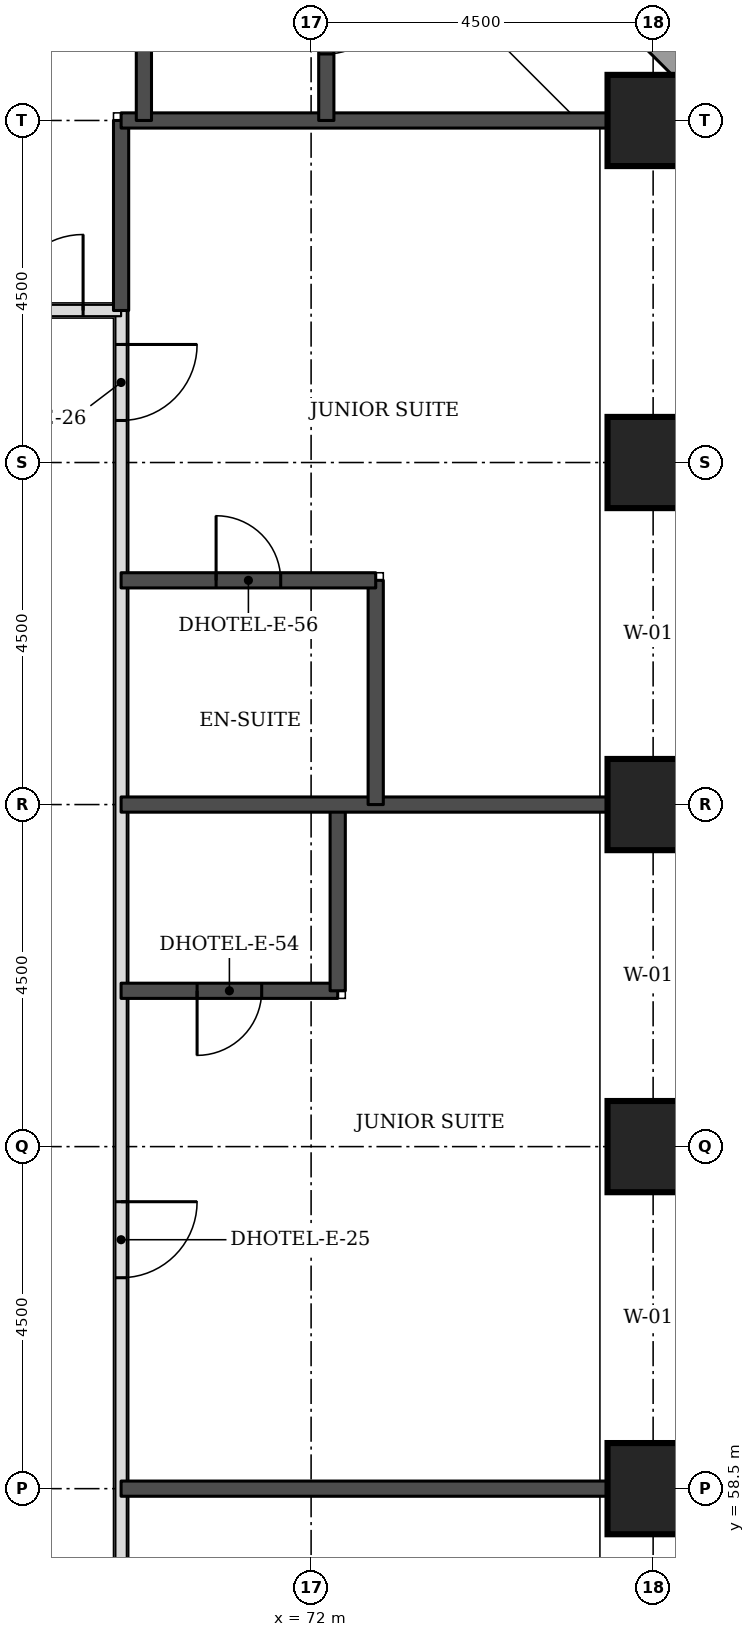
"""IFC4 building model, lengths in metres.
Left out: names, types, materials, properties, quantities, classifications, styles, units other than length and angle.
Written with IfcOpenShell. Run it as: python <this file> out.ifc"""

import sys

from ifc_helpers import new_model, si_unit, direction, frame, frame_2d, origin, origin_2d, place, context, subcontext, project, spatial, rectangle, extrude, element, fill, save


model = new_model("IFC4")
c1 = context("Model", 3, precision=1e-05, world=origin(), true_north=direction((0.0, 1.0)))
c2 = subcontext(c1, "Body", "Model", "MODEL_VIEW")
j1 = project(units=[si_unit("LENGTHUNIT", "METRE"), si_unit("PLANEANGLEUNIT", "RADIAN")], contexts=[c1])
p1 = place(None, origin())
s1 = spatial("IfcSite", under=j1, at=p1, CompositionType="ELEMENT")
p2 = place(p1, origin())
s2 = spatial("IfcBuilding", under=s1, at=p2, CompositionType="ELEMENT")
p3 = place(p2, frame((0.0, 0.0, 39.6)))
s3 = spatial("IfcBuildingStorey", under=s2, at=p3, CompositionType="ELEMENT", Elevation=39.6)
for number, where, z_axis, x_axis in (
    (1, (76.5, 58.5, 0.0), (0.0, 0.0, 1.0), (1.0, 0.0, 0.0)),
    (2, (76.5, 63.0, 0.0), (0.0, 0.0, 1.0), (1.0, 0.0, 0.0)),
    (3, (76.5, 67.5, 0.0), (0.0, 0.0, 1.0), (1.0, 0.0, 0.0)),
    (4, (76.5, 72.0, 0.0), (0.0, 0.0, 1.0), (1.0, 0.0, 0.0)),
    (5, (76.5, 76.5, 0.0), (0.0, 0.0, 1.0), (1.0, 0.0, 0.0)),
):
    element("IfcColumn", number, at=place(p3, frame(where, z_axis=z_axis, x_axis=x_axis)), inside=s3, PredefinedType="COLUMN", context=c2, shape_type="SweptSolid", body=[
        extrude(rectangle(XDim=1.2, YDim=1.2, at=origin_2d()), origin(), (0.0, 0.0, 1.0), 3.3),
    ])
p4 = place(p3, frame((77.326, 76.77, 0.0), z_axis=(0.0, 0.0, 1.0), x_axis=(-0.707106781187, 0.707106781187, 0.0)))
e6 = element("IfcWall", 6, at=p4, inside=s3, PredefinedType="STANDARD", context=c2, shape_type="SweptSolid", body=[
    extrude(rectangle(XDim=7.151, YDim=0.35, at=frame_2d((3.576, 0.0))), origin(), (0.0, 0.0, 1.0), 3.055),
])
p5 = place(p4, frame((1.926, 0.0, 0.8)))
e7 = element("IfcOpeningElement", 7, at=p5, cuts=e6, PredefinedType="OPENING", context=c2, shape_type="SweptSolid", body=[
    extrude(rectangle(XDim=3.3, YDim=1.5, at=frame_2d((1.65, 0.75))), frame((0.0, 0.185, 0.0), z_axis=(0.0, -1.0, 0.0), x_axis=(1.0, 0.0, 0.0)), (0.0, 0.0, 1.0), 0.37),
])
p6 = place(p3, frame((69.5, 47.5, 0.0), z_axis=(0.0, 0.0, 1.0), x_axis=(0.0, 1.0, 0.0)))
e8 = element("IfcWall", 8, at=p6, inside=s3, PredefinedType="PARTITIONING", context=c2, shape_type="SweptSolid", body=[
    extrude(rectangle(XDim=26.5, YDim=0.15, at=frame_2d((13.25, 0.0))), origin(), (0.0, 0.0, 1.0), 3.08),
])
p7 = place(p6, frame((25.053, 0.0, 0.0)))
e9 = element("IfcOpeningElement", 9, at=p7, cuts=e8, PredefinedType="OPENING", context=c2, shape_type="SweptSolid", body=[
    extrude(rectangle(XDim=1.0, YDim=2.1, at=frame_2d((0.5, 1.05))), frame((0.0, 0.085, 0.0), z_axis=(0.0, -1.0, 0.0), x_axis=(1.0, 0.0, 0.0)), (0.0, 0.0, 1.0), 0.17),
])
p8 = place(p6, frame((13.775, 0.0, 0.0)))
e10 = element("IfcOpeningElement", 10, at=p8, cuts=e8, PredefinedType="OPENING", context=c2, shape_type="SweptSolid", body=[
    extrude(rectangle(XDim=1.0, YDim=2.1, at=frame_2d((0.5, 1.05))), frame((0.0, 0.085, 0.0), z_axis=(0.0, -1.0, 0.0), x_axis=(1.0, 0.0, 0.0)), (0.0, 0.0, 1.0), 0.17),
])
p9 = place(p6, frame((7.65, 0.0, 0.0)))
e11 = element("IfcOpeningElement", 11, at=p9, cuts=e8, PredefinedType="OPENING", context=c2, shape_type="SweptSolid", body=[
    extrude(rectangle(XDim=1.1, YDim=2.1, at=frame_2d((0.55, 1.05))), frame((0.0, 0.085, 0.0), z_axis=(0.0, -1.0, 0.0), x_axis=(1.0, 0.0, 0.0)), (0.0, 0.0, 1.0), 0.17),
])
p10 = place(p6, frame((0.447, 0.0, 0.0)))
e12 = element("IfcOpeningElement", 12, at=p10, cuts=e8, PredefinedType="OPENING", context=c2, shape_type="SweptSolid", body=[
    extrude(rectangle(XDim=1.0, YDim=2.1, at=frame_2d((0.5, 1.05))), frame((0.0, 0.085, 0.0), z_axis=(0.0, -1.0, 0.0), x_axis=(1.0, 0.0, 0.0)), (0.0, 0.0, 1.0), 0.17),
])
p11 = place(p3, frame((43.0, 74.0, 0.0), z_axis=(0.0, 0.0, 1.0), x_axis=(1.0, 0.0, 0.0)))
e13 = element("IfcWall", 13, at=p11, inside=s3, PredefinedType="PARTITIONING", context=c2, shape_type="SweptSolid", body=[
    extrude(rectangle(XDim=26.5, YDim=0.15, at=frame_2d((13.25, 0.0))), origin(), (0.0, 0.0, 1.0), 3.08),
])
p12 = place(p11, frame((2.825, 0.0, 0.0)))
e14 = element("IfcOpeningElement", 14, at=p12, cuts=e13, PredefinedType="OPENING", context=c2, shape_type="SweptSolid", body=[
    extrude(rectangle(XDim=1.0, YDim=2.1, at=frame_2d((0.5, 1.05))), frame((0.0, 0.085, 0.0), z_axis=(0.0, -1.0, 0.0), x_axis=(1.0, 0.0, 0.0)), (0.0, 0.0, 1.0), 0.17),
])
p13 = place(p11, frame((11.975, 0.0, 0.0)))
e15 = element("IfcOpeningElement", 15, at=p13, cuts=e13, PredefinedType="OPENING", context=c2, shape_type="SweptSolid", body=[
    extrude(rectangle(XDim=1.0, YDim=2.1, at=frame_2d((0.5, 1.05))), frame((0.0, 0.085, 0.0), z_axis=(0.0, -1.0, 0.0), x_axis=(1.0, 0.0, 0.0)), (0.0, 0.0, 1.0), 0.17),
])
p14 = place(p11, frame((18.275, 0.0, 0.0)))
e16 = element("IfcOpeningElement", 16, at=p14, cuts=e13, PredefinedType="OPENING", context=c2, shape_type="SweptSolid", body=[
    extrude(rectangle(XDim=1.0, YDim=2.1, at=frame_2d((0.5, 1.05))), frame((0.0, 0.085, 0.0), z_axis=(0.0, -1.0, 0.0), x_axis=(1.0, 0.0, 0.0)), (0.0, 0.0, 1.0), 0.17),
])
p15 = place(p11, frame((0.5, 0.0, 0.0)))
e17 = element("IfcOpeningElement", 17, at=p15, cuts=e13, PredefinedType="OPENING", context=c2, shape_type="SweptSolid", body=[
    extrude(rectangle(XDim=1.0, YDim=2.1, at=frame_2d((0.5, 1.05))), frame((0.0, 0.085, 0.0), z_axis=(0.0, -1.0, 0.0), x_axis=(1.0, 0.0, 0.0)), (0.0, 0.0, 1.0), 0.17),
])
p16 = place(p11, frame((25.0, 0.0, 0.0)))
e18 = element("IfcOpeningElement", 18, at=p16, cuts=e13, PredefinedType="OPENING", context=c2, shape_type="SweptSolid", body=[
    extrude(rectangle(XDim=1.0, YDim=2.1, at=frame_2d((0.5, 1.05))), frame((0.0, 0.085, 0.0), z_axis=(0.0, -1.0, 0.0), x_axis=(1.0, 0.0, 0.0)), (0.0, 0.0, 1.0), 0.17),
])
p17 = place(p3, frame((69.5, 58.5, 0.0), z_axis=(0.0, 0.0, 1.0), x_axis=(1.0, 0.0, 0.0)))
e19 = element("IfcWall", 19, at=p17, inside=s3, PredefinedType="SOLIDWALL", context=c2, shape_type="SweptSolid", body=[
    extrude(rectangle(XDim=6.4, YDim=0.2, at=frame_2d((3.2, 0.0))), origin(), (0.0, 0.0, 1.0), 3.08),
])
p18 = place(p3, frame((69.5, 65.05, 0.0), z_axis=(0.0, 0.0, 1.0), x_axis=(1.0, 0.0, 0.0)))
e20 = element("IfcWall", 20, at=p18, inside=s3, PredefinedType="SOLIDWALL", context=c2, shape_type="SweptSolid", body=[
    extrude(rectangle(XDim=2.85, YDim=0.2, at=frame_2d((1.425, 0.0))), origin(), (0.0, 0.0, 1.0), 3.08),
])
p19 = place(p18, frame((1.0, 0.0, 0.0)))
e21 = element("IfcOpeningElement", 21, at=p19, cuts=e20, PredefinedType="OPENING", context=c2, shape_type="SweptSolid", body=[
    extrude(rectangle(XDim=0.85, YDim=2.1, at=frame_2d((0.425, 1.05))), frame((0.0, 0.11, 0.0), z_axis=(0.0, -1.0, 0.0), x_axis=(1.0, 0.0, 0.0)), (0.0, 0.0, 1.0), 0.22),
])
p20 = place(p3, frame((72.35, 65.05, 0.0), z_axis=(0.0, 0.0, 1.0), x_axis=(0.0, 1.0, 0.0)))
e22 = element("IfcWall", 22, at=p20, inside=s3, PredefinedType="SOLIDWALL", context=c2, shape_type="SweptSolid", body=[
    extrude(rectangle(XDim=2.45, YDim=0.2, at=frame_2d((1.225, 0.0))), origin(), (0.0, 0.0, 1.0), 3.08),
])
p21 = place(p3, frame((69.5, 67.5, 0.0), z_axis=(0.0, 0.0, 1.0), x_axis=(1.0, 0.0, 0.0)))
e23 = element("IfcWall", 23, at=p21, inside=s3, PredefinedType="SOLIDWALL", context=c2, shape_type="SweptSolid", body=[
    extrude(rectangle(XDim=6.4, YDim=0.2, at=frame_2d((3.2, 0.0))), origin(), (0.0, 0.0, 1.0), 3.08),
])
p22 = place(p3, frame((72.85, 67.5, 0.0), z_axis=(0.0, 0.0, 1.0), x_axis=(0.0, 1.0, 0.0)))
e24 = element("IfcWall", 24, at=p22, inside=s3, PredefinedType="SOLIDWALL", context=c2, shape_type="SweptSolid", body=[
    extrude(rectangle(XDim=2.95, YDim=0.2, at=frame_2d((1.475, 0.0))), origin(), (0.0, 0.0, 1.0), 3.08),
])
p23 = place(p3, frame((69.5, 70.45, 0.0), z_axis=(0.0, 0.0, 1.0), x_axis=(1.0, 0.0, 0.0)))
e25 = element("IfcWall", 25, at=p23, inside=s3, PredefinedType="SOLIDWALL", context=c2, shape_type="SweptSolid", body=[
    extrude(rectangle(XDim=3.35, YDim=0.2, at=frame_2d((1.675, 0.0))), origin(), (0.0, 0.0, 1.0), 3.08),
])
p24 = place(p23, frame((1.25, 0.0, 0.0)))
e26 = element("IfcOpeningElement", 26, at=p24, cuts=e25, PredefinedType="OPENING", context=c2, shape_type="SweptSolid", body=[
    extrude(rectangle(XDim=0.85, YDim=2.1, at=frame_2d((0.425, 1.05))), frame((0.0, 0.11, 0.0), z_axis=(0.0, -1.0, 0.0), x_axis=(1.0, 0.0, 0.0)), (0.0, 0.0, 1.0), 0.22),
])
p25 = place(p3, frame((69.5, 74.0, 0.0), z_axis=(0.0, 0.0, 1.0), x_axis=(0.0, 1.0, 0.0)))
e27 = element("IfcWall", 27, at=p25, inside=s3, PredefinedType="SOLIDWALL", context=c2, shape_type="SweptSolid", body=[
    extrude(rectangle(XDim=2.5, YDim=0.2, at=frame_2d((1.25, 0.0))), origin(), (0.0, 0.0, 1.0), 3.08),
])
p26 = place(p3, frame((69.5, 76.5, 0.0), z_axis=(0.0, 0.0, 1.0), x_axis=(1.0, 0.0, 0.0)))
e28 = element("IfcWall", 28, at=p26, inside=s3, PredefinedType="SOLIDWALL", context=c2, shape_type="SweptSolid", body=[
    extrude(rectangle(XDim=6.4, YDim=0.2, at=frame_2d((3.2, 0.0))), origin(), (0.0, 0.0, 1.0), 3.08),
])
p27 = place(p3, frame((69.8, 76.5, 0.0), z_axis=(0.0, 0.0, 1.0), x_axis=(0.0, 1.0, 0.0)))
e29 = element("IfcWall", 29, at=p27, inside=s3, PredefinedType="SOLIDWALL", context=c2, shape_type="SweptSolid", body=[
    extrude(rectangle(XDim=2.5, YDim=0.2, at=frame_2d((1.25, 0.0))), origin(), (0.0, 0.0, 1.0), 3.08),
])
p28 = place(p3, frame((72.2, 76.5, 0.0), z_axis=(0.0, 0.0, 1.0), x_axis=(0.0, 1.0, 0.0)))
e30 = element("IfcWall", 30, at=p28, inside=s3, PredefinedType="SOLIDWALL", context=c2, shape_type="SweptSolid", body=[
    extrude(rectangle(XDim=2.5, YDim=0.2, at=frame_2d((1.25, 0.0))), origin(), (0.0, 0.0, 1.0), 3.08),
])
p29 = place(p28, frame((0.875, 0.0, 0.0)))
e31 = element("IfcOpeningElement", 31, at=p29, cuts=e30, PredefinedType="OPENING", context=c2, shape_type="SweptSolid", body=[
    extrude(rectangle(XDim=0.85, YDim=2.1, at=frame_2d((0.425, 1.05))), frame((0.0, 0.11, 0.0), z_axis=(0.0, -1.0, 0.0), x_axis=(1.0, 0.0, 0.0)), (0.0, 0.0, 1.0), 0.22),
])
p30 = place(p7, frame((1.0, 0.0, 0.0), z_axis=(0.0, 0.0, 1.0), x_axis=(-1.0, 0.0, 0.0)))
e32 = element("IfcDoor", 32, at=p30, inside=s3, OperationType="SINGLE_SWING_LEFT", PredefinedType="DOOR", context=c2, shape_type="SweptSolid", body=[
    extrude(rectangle(XDim=1.0, YDim=2.1, at=frame_2d((0.5, 1.05))), frame((0.0, 0.025, 0.0), z_axis=(0.0, -1.0, 0.0), x_axis=(1.0, 0.0, 0.0)), (0.0, 0.0, 1.0), 0.05),
])
fill(e9, e32)
p31 = place(p24, origin())
e33 = element("IfcDoor", 33, at=p31, inside=s3, OperationType="SINGLE_SWING_LEFT", PredefinedType="DOOR", context=c2, shape_type="SweptSolid", body=[
    extrude(rectangle(XDim=0.85, YDim=2.1, at=frame_2d((0.425, 1.05))), frame((0.0, 0.025, 0.0), z_axis=(0.0, -1.0, 0.0), x_axis=(1.0, 0.0, 0.0)), (0.0, 0.0, 1.0), 0.05),
])
fill(e26, e33)
p32 = place(p8, frame((1.0, 0.0, 0.0), z_axis=(0.0, 0.0, 1.0), x_axis=(-1.0, 0.0, 0.0)))
e34 = element("IfcDoor", 34, at=p32, inside=s3, OperationType="SINGLE_SWING_LEFT", PredefinedType="DOOR", context=c2, shape_type="SweptSolid", body=[
    extrude(rectangle(XDim=1.0, YDim=2.1, at=frame_2d((0.5, 1.05))), frame((0.0, 0.025, 0.0), z_axis=(0.0, -1.0, 0.0), x_axis=(1.0, 0.0, 0.0)), (0.0, 0.0, 1.0), 0.05),
])
fill(e10, e34)
p33 = place(p19, frame((0.85, 0.0, 0.0), z_axis=(0.0, 0.0, 1.0), x_axis=(-1.0, 0.0, 0.0)))
e35 = element("IfcDoor", 35, at=p33, inside=s3, OperationType="SINGLE_SWING_RIGHT", PredefinedType="DOOR", context=c2, shape_type="SweptSolid", body=[
    extrude(rectangle(XDim=0.85, YDim=2.1, at=frame_2d((0.425, 1.05))), frame((0.0, 0.025, 0.0), z_axis=(0.0, -1.0, 0.0), x_axis=(1.0, 0.0, 0.0)), (0.0, 0.0, 1.0), 0.05),
])
fill(e21, e35)
p34 = place(p16, origin())
e36 = element("IfcDoor", 36, at=p34, inside=s3, OperationType="SINGLE_SWING_RIGHT", PredefinedType="DOOR", context=c2, shape_type="SweptSolid", body=[
    extrude(rectangle(XDim=1.0, YDim=2.1, at=frame_2d((0.5, 1.05))), frame((0.0, 0.025, 0.0), z_axis=(0.0, -1.0, 0.0), x_axis=(1.0, 0.0, 0.0)), (0.0, 0.0, 1.0), 0.05),
])
fill(e18, e36)
p35 = place(p29, frame((0.85, 0.0, 0.0), z_axis=(0.0, 0.0, 1.0), x_axis=(-1.0, 0.0, 0.0)))
e37 = element("IfcDoor", 37, at=p35, inside=s3, OperationType="SINGLE_SWING_LEFT", PredefinedType="DOOR", context=c2, shape_type="SweptSolid", body=[
    extrude(rectangle(XDim=0.85, YDim=2.1, at=frame_2d((0.425, 1.05))), frame((0.0, 0.025, 0.0), z_axis=(0.0, -1.0, 0.0), x_axis=(1.0, 0.0, 0.0)), (0.0, 0.0, 1.0), 0.05),
])
fill(e31, e37)
save(model, sys.argv[1])
